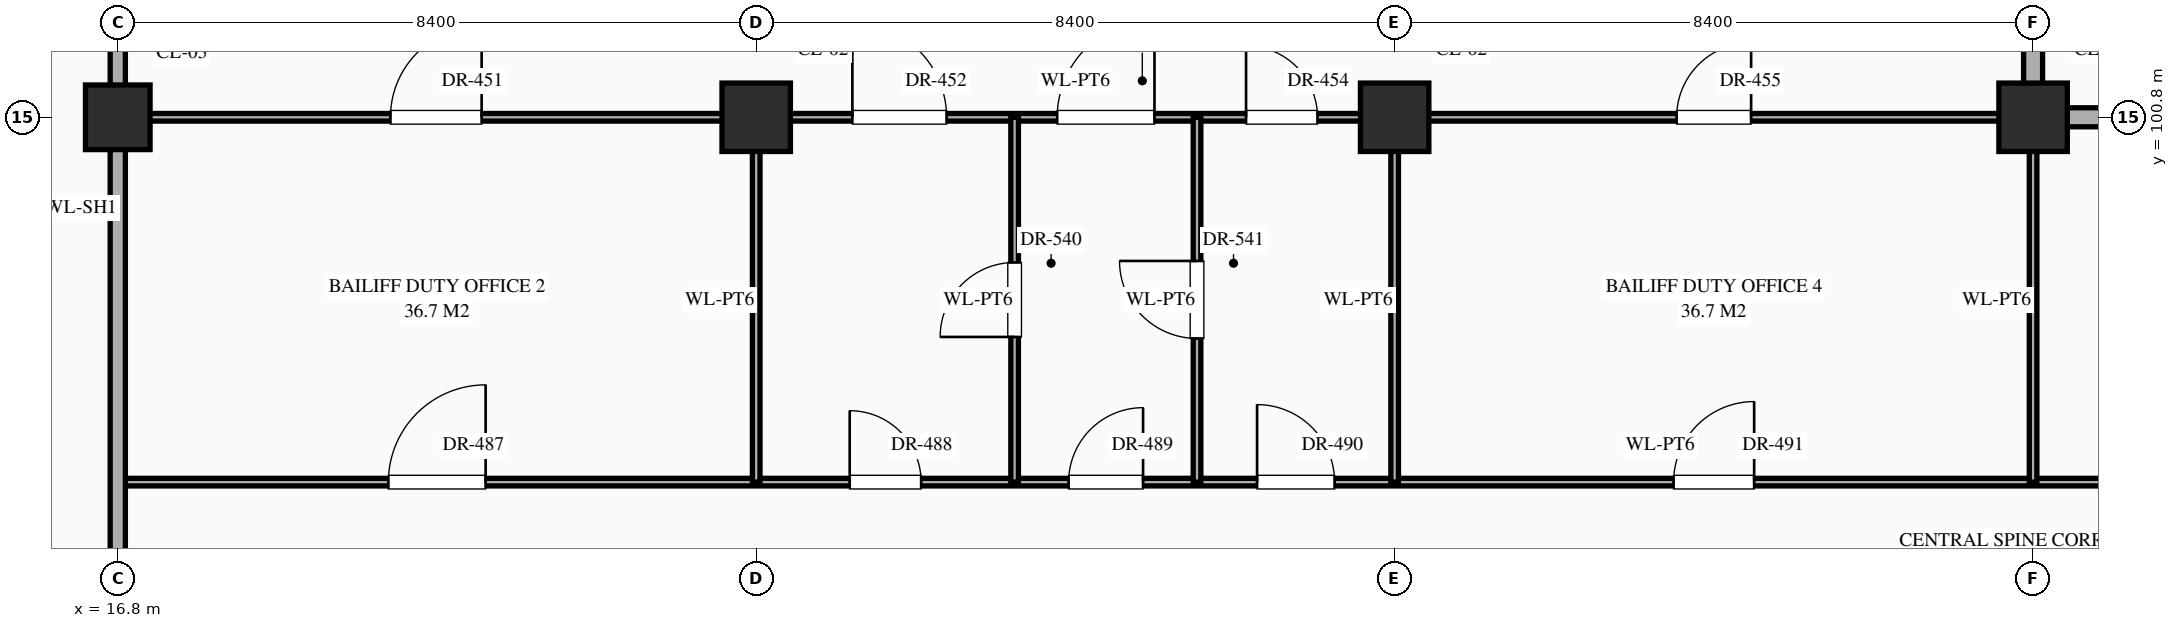
"""IFC4 building model, lengths in metres.
Left out: names, types, materials, properties, quantities, classifications, styles, units other than length and angle.
Written with IfcOpenShell. Run it as: python <this file> out.ifc"""

import sys

from ifc_helpers import new_model, si_unit, direction, frame, frame_2d, origin, origin_2d, place, context, subcontext, project, spatial, rectangle, extrude, element, fill, save


model = new_model("IFC4")
c1 = context("Model", 3, precision=1e-05, world=origin(), true_north=direction((0.0, 1.0)))
c2 = subcontext(c1, "Body", "Model", "MODEL_VIEW")
j1 = project(units=[si_unit("LENGTHUNIT", "METRE"), si_unit("PLANEANGLEUNIT", "RADIAN")], contexts=[c1])
p1 = place(None, origin())
s1 = spatial("IfcSite", under=j1, at=p1, CompositionType="ELEMENT")
p2 = place(p1, origin())
s2 = spatial("IfcBuilding", under=s1, at=p2, CompositionType="ELEMENT")
p3 = place(p2, frame((0.0, 0.0, -5.4)))
s3 = spatial("IfcBuildingStorey", under=s2, at=p3, CompositionType="ELEMENT", Elevation=-5.4)
p4 = place(p3, frame((16.8, 100.8, 0.0), z_axis=(0.0, 0.0, 1.0), x_axis=(1.0, 0.0, 0.0)))
e1 = element("IfcColumn", 1, at=p4, inside=s3, PredefinedType="COLUMN", context=c2, shape_type="SweptSolid", body=[
    extrude(rectangle(XDim=0.85, YDim=0.85, at=origin_2d()), origin(), (0.0, 0.0, 1.0), 5.4),
])
for number, where, z_axis, x_axis in (
    (2, (25.2, 100.8, 0.0), (0.0, 0.0, 1.0), (1.0, 0.0, 0.0)),
    (3, (33.6, 100.8, 0.0), (0.0, 0.0, 1.0), (1.0, 0.0, 0.0)),
    (4, (42.0, 100.8, 0.0), (0.0, 0.0, 1.0), (1.0, 0.0, 0.0)),
):
    element("IfcColumn", number, at=place(p3, frame(where, z_axis=z_axis, x_axis=x_axis)), inside=s3, PredefinedType="COLUMN", context=c2, shape_type="SweptSolid", body=[
        extrude(rectangle(XDim=0.9, YDim=0.9, at=origin_2d()), origin(), (0.0, 0.0, 1.0), 5.4),
    ])
p5 = place(p3, frame((16.8, 96.0, 0.0), z_axis=(0.0, 0.0, 1.0), x_axis=(1.0, 0.0, 0.0)))
e5 = element("IfcWall", 5, at=p5, inside=s3, PredefinedType="STANDARD", context=c2, shape_type="SweptSolid", body=[
    extrude(rectangle(XDim=134.4, YDim=0.1, at=frame_2d((67.2, 0.0))), origin(), (0.0, 0.0, 1.0), 5.1),
])
p6 = place(p5, frame((3.56, 0.0, 0.0)))
e6 = element("IfcOpeningElement", 6, at=p6, cuts=e5, PredefinedType="OPENING", context=c2, shape_type="SweptSolid", body=[
    extrude(rectangle(XDim=1.28, YDim=2.35, at=frame_2d((0.64, 1.175))), frame((0.0, 0.062, 0.0), z_axis=(0.0, -1.0, 0.0), x_axis=(1.0, 0.0, 0.0)), (0.0, 0.0, 1.0), 0.124),
])
p7 = place(p5, frame((9.63, 0.0, 0.0)))
e7 = element("IfcOpeningElement", 7, at=p7, cuts=e5, PredefinedType="OPENING", context=c2, shape_type="SweptSolid", body=[
    extrude(rectangle(XDim=0.94, YDim=2.3, at=frame_2d((0.47, 1.15))), frame((0.0, 0.062, 0.0), z_axis=(0.0, -1.0, 0.0), x_axis=(1.0, 0.0, 0.0)), (0.0, 0.0, 1.0), 0.124),
])
p8 = place(p5, frame((12.51, 0.0, 0.0)))
e8 = element("IfcOpeningElement", 8, at=p8, cuts=e5, PredefinedType="OPENING", context=c2, shape_type="SweptSolid", body=[
    extrude(rectangle(XDim=0.98, YDim=2.35, at=frame_2d((0.49, 1.175))), frame((0.0, 0.062, 0.0), z_axis=(0.0, -1.0, 0.0), x_axis=(1.0, 0.0, 0.0)), (0.0, 0.0, 1.0), 0.124),
])
p9 = place(p5, frame((14.99, 0.0, 0.0)))
e9 = element("IfcOpeningElement", 9, at=p9, cuts=e5, PredefinedType="OPENING", context=c2, shape_type="SweptSolid", body=[
    extrude(rectangle(XDim=1.02, YDim=2.4, at=frame_2d((0.51, 1.2))), frame((0.0, 0.062, 0.0), z_axis=(0.0, -1.0, 0.0), x_axis=(1.0, 0.0, 0.0)), (0.0, 0.0, 1.0), 0.124),
])
p10 = place(p5, frame((20.47, 0.0, 0.0)))
e10 = element("IfcOpeningElement", 10, at=p10, cuts=e5, PredefinedType="OPENING", context=c2, shape_type="SweptSolid", body=[
    extrude(rectangle(XDim=1.06, YDim=2.4, at=frame_2d((0.53, 1.2))), frame((0.0, 0.062, 0.0), z_axis=(0.0, -1.0, 0.0), x_axis=(1.0, 0.0, 0.0)), (0.0, 0.0, 1.0), 0.124),
])
p11 = place(p5, frame((28.83, 0.0, 0.0)))
e11 = element("IfcOpeningElement", 11, at=p11, cuts=e5, PredefinedType="OPENING", context=c2, shape_type="SweptSolid", body=[
    extrude(rectangle(XDim=1.14, YDim=2.4, at=frame_2d((0.57, 1.2))), frame((0.0, 0.062, 0.0), z_axis=(0.0, -1.0, 0.0), x_axis=(1.0, 0.0, 0.0)), (0.0, 0.0, 1.0), 0.124),
])
p12 = place(p5, frame((34.78, 0.0, 0.0)))
e12 = element("IfcOpeningElement", 12, at=p12, cuts=e5, PredefinedType="OPENING", context=c2, shape_type="SweptSolid", body=[
    extrude(rectangle(XDim=1.04, YDim=2.2, at=frame_2d((0.52, 1.1))), frame((0.0, 0.062, 0.0), z_axis=(0.0, -1.0, 0.0), x_axis=(1.0, 0.0, 0.0)), (0.0, 0.0, 1.0), 0.124),
])
p13 = place(p5, frame((37.66, 0.0, 0.0)))
e13 = element("IfcOpeningElement", 13, at=p13, cuts=e5, PredefinedType="OPENING", context=c2, shape_type="SweptSolid", body=[
    extrude(rectangle(XDim=1.08, YDim=2.25, at=frame_2d((0.54, 1.125))), frame((0.0, 0.062, 0.0), z_axis=(0.0, -1.0, 0.0), x_axis=(1.0, 0.0, 0.0)), (0.0, 0.0, 1.0), 0.124),
])
p14 = place(p5, frame((40.14, 0.0, 0.0)))
e14 = element("IfcOpeningElement", 14, at=p14, cuts=e5, PredefinedType="OPENING", context=c2, shape_type="SweptSolid", body=[
    extrude(rectangle(XDim=1.12, YDim=2.25, at=frame_2d((0.56, 1.125))), frame((0.0, 0.062, 0.0), z_axis=(0.0, -1.0, 0.0), x_axis=(1.0, 0.0, 0.0)), (0.0, 0.0, 1.0), 0.124),
])
p15 = place(p5, frame((45.62, 0.0, 0.0)))
e15 = element("IfcOpeningElement", 15, at=p15, cuts=e5, PredefinedType="OPENING", context=c2, shape_type="SweptSolid", body=[
    extrude(rectangle(XDim=1.16, YDim=2.3, at=frame_2d((0.58, 1.15))), frame((0.0, 0.062, 0.0), z_axis=(0.0, -1.0, 0.0), x_axis=(1.0, 0.0, 0.0)), (0.0, 0.0, 1.0), 0.124),
])
p16 = place(p5, frame((54.0, 0.0, 0.0)))
e16 = element("IfcOpeningElement", 16, at=p16, cuts=e5, PredefinedType="OPENING", context=c2, shape_type="SweptSolid", body=[
    extrude(rectangle(XDim=1.2, YDim=2.35, at=frame_2d((0.6, 1.175))), frame((0.0, 0.062, 0.0), z_axis=(0.0, -1.0, 0.0), x_axis=(1.0, 0.0, 0.0)), (0.0, 0.0, 1.0), 0.124),
])
p17 = place(p5, frame((62.38, 0.0, 0.0)))
e17 = element("IfcOpeningElement", 17, at=p17, cuts=e5, PredefinedType="OPENING", context=c2, shape_type="SweptSolid", body=[
    extrude(rectangle(XDim=1.24, YDim=2.3, at=frame_2d((0.62, 1.15))), frame((0.0, 0.062, 0.0), z_axis=(0.0, -1.0, 0.0), x_axis=(1.0, 0.0, 0.0)), (0.0, 0.0, 1.0), 0.124),
])
p18 = place(p5, frame((68.37, 0.0, 0.0)))
e18 = element("IfcOpeningElement", 18, at=p18, cuts=e5, PredefinedType="OPENING", context=c2, shape_type="SweptSolid", body=[
    extrude(rectangle(XDim=1.06, YDim=2.4, at=frame_2d((0.53, 1.2))), frame((0.0, 0.062, 0.0), z_axis=(0.0, -1.0, 0.0), x_axis=(1.0, 0.0, 0.0)), (0.0, 0.0, 1.0), 0.124),
])
p19 = place(p5, frame((71.23, 0.0, 0.0)))
e19 = element("IfcOpeningElement", 19, at=p19, cuts=e5, PredefinedType="OPENING", context=c2, shape_type="SweptSolid", body=[
    extrude(rectangle(XDim=1.14, YDim=2.4, at=frame_2d((0.57, 1.2))), frame((0.0, 0.062, 0.0), z_axis=(0.0, -1.0, 0.0), x_axis=(1.0, 0.0, 0.0)), (0.0, 0.0, 1.0), 0.124),
])
p20 = place(p5, frame((73.85, 0.0, 0.0)))
e20 = element("IfcOpeningElement", 20, at=p20, cuts=e5, PredefinedType="OPENING", context=c2, shape_type="SweptSolid", body=[
    extrude(rectangle(XDim=0.9, YDim=2.15, at=frame_2d((0.45, 1.075))), frame((0.0, 0.062, 0.0), z_axis=(0.0, -1.0, 0.0), x_axis=(1.0, 0.0, 0.0)), (0.0, 0.0, 1.0), 0.124),
])
p21 = place(p5, frame((79.37, 0.0, 0.0)))
e21 = element("IfcOpeningElement", 21, at=p21, cuts=e5, PredefinedType="OPENING", context=c2, shape_type="SweptSolid", body=[
    extrude(rectangle(XDim=0.86, YDim=2.1, at=frame_2d((0.43, 1.05))), frame((0.0, 0.062, 0.0), z_axis=(0.0, -1.0, 0.0), x_axis=(1.0, 0.0, 0.0)), (0.0, 0.0, 1.0), 0.124),
])
p22 = place(p5, frame((87.74, 0.0, 0.0)))
e22 = element("IfcOpeningElement", 22, at=p22, cuts=e5, PredefinedType="OPENING", context=c2, shape_type="SweptSolid", body=[
    extrude(rectangle(XDim=0.92, YDim=2.15, at=frame_2d((0.46, 1.075))), frame((0.0, 0.062, 0.0), z_axis=(0.0, -1.0, 0.0), x_axis=(1.0, 0.0, 0.0)), (0.0, 0.0, 1.0), 0.124),
])
p23 = place(p5, frame((93.62, 0.0, 0.0)))
e23 = element("IfcOpeningElement", 23, at=p23, cuts=e5, PredefinedType="OPENING", context=c2, shape_type="SweptSolid", body=[
    extrude(rectangle(XDim=0.96, YDim=2.2, at=frame_2d((0.48, 1.1))), frame((0.0, 0.062, 0.0), z_axis=(0.0, -1.0, 0.0), x_axis=(1.0, 0.0, 0.0)), (0.0, 0.0, 1.0), 0.124),
])
p24 = place(p5, frame((96.5, 0.0, 0.0)))
e24 = element("IfcOpeningElement", 24, at=p24, cuts=e5, PredefinedType="OPENING", context=c2, shape_type="SweptSolid", body=[
    extrude(rectangle(XDim=1.0, YDim=2.25, at=frame_2d((0.5, 1.125))), frame((0.0, 0.062, 0.0), z_axis=(0.0, -1.0, 0.0), x_axis=(1.0, 0.0, 0.0)), (0.0, 0.0, 1.0), 0.124),
])
p25 = place(p5, frame((98.98, 0.0, 0.0)))
e25 = element("IfcOpeningElement", 25, at=p25, cuts=e5, PredefinedType="OPENING", context=c2, shape_type="SweptSolid", body=[
    extrude(rectangle(XDim=1.04, YDim=2.2, at=frame_2d((0.52, 1.1))), frame((0.0, 0.062, 0.0), z_axis=(0.0, -1.0, 0.0), x_axis=(1.0, 0.0, 0.0)), (0.0, 0.0, 1.0), 0.124),
])
p26 = place(p5, frame((104.53, 0.0, 0.0)))
e26 = element("IfcOpeningElement", 26, at=p26, cuts=e5, PredefinedType="OPENING", context=c2, shape_type="SweptSolid", body=[
    extrude(rectangle(XDim=0.94, YDim=2.3, at=frame_2d((0.47, 1.15))), frame((0.0, 0.062, 0.0), z_axis=(0.0, -1.0, 0.0), x_axis=(1.0, 0.0, 0.0)), (0.0, 0.0, 1.0), 0.124),
])
p27 = place(p5, frame((112.91, 0.0, 0.0)))
e27 = element("IfcOpeningElement", 27, at=p27, cuts=e5, PredefinedType="OPENING", context=c2, shape_type="SweptSolid", body=[
    extrude(rectangle(XDim=0.98, YDim=2.35, at=frame_2d((0.49, 1.175))), frame((0.0, 0.062, 0.0), z_axis=(0.0, -1.0, 0.0), x_axis=(1.0, 0.0, 0.0)), (0.0, 0.0, 1.0), 0.124),
])
p28 = place(p5, frame((118.79, 0.0, 0.0)))
e28 = element("IfcOpeningElement", 28, at=p28, cuts=e5, PredefinedType="OPENING", context=c2, shape_type="SweptSolid", body=[
    extrude(rectangle(XDim=1.02, YDim=2.4, at=frame_2d((0.51, 1.2))), frame((0.0, 0.062, 0.0), z_axis=(0.0, -1.0, 0.0), x_axis=(1.0, 0.0, 0.0)), (0.0, 0.0, 1.0), 0.124),
])
p29 = place(p5, frame((121.67, 0.0, 0.0)))
e29 = element("IfcOpeningElement", 29, at=p29, cuts=e5, PredefinedType="OPENING", context=c2, shape_type="SweptSolid", body=[
    extrude(rectangle(XDim=1.06, YDim=2.4, at=frame_2d((0.53, 1.2))), frame((0.0, 0.062, 0.0), z_axis=(0.0, -1.0, 0.0), x_axis=(1.0, 0.0, 0.0)), (0.0, 0.0, 1.0), 0.124),
])
p30 = place(p5, frame((124.13, 0.0, 0.0)))
e30 = element("IfcOpeningElement", 30, at=p30, cuts=e5, PredefinedType="OPENING", context=c2, shape_type="SweptSolid", body=[
    extrude(rectangle(XDim=1.14, YDim=2.4, at=frame_2d((0.57, 1.2))), frame((0.0, 0.062, 0.0), z_axis=(0.0, -1.0, 0.0), x_axis=(1.0, 0.0, 0.0)), (0.0, 0.0, 1.0), 0.124),
])
p31 = place(p5, frame((129.75, 0.0, 0.0)))
e31 = element("IfcOpeningElement", 31, at=p31, cuts=e5, PredefinedType="OPENING", context=c2, shape_type="SweptSolid", body=[
    extrude(rectangle(XDim=0.9, YDim=2.15, at=frame_2d((0.45, 1.075))), frame((0.0, 0.062, 0.0), z_axis=(0.0, -1.0, 0.0), x_axis=(1.0, 0.0, 0.0)), (0.0, 0.0, 1.0), 0.124),
])
p32 = place(p3, frame((16.8, 100.8, 0.0), z_axis=(0.0, 0.0, 1.0), x_axis=(1.0, 0.0, 0.0)))
e32 = element("IfcWall", 32, at=p32, inside=s3, PredefinedType="STANDARD", context=c2, shape_type="SweptSolid", body=[
    extrude(rectangle(XDim=25.2, YDim=0.1, at=frame_2d((12.6, 0.0))), origin(), (0.0, 0.0, 1.0), 4.25),
])
p33 = place(p32, frame((3.587, 0.0, 0.0)))
e33 = element("IfcOpeningElement", 33, at=p33, cuts=e32, PredefinedType="OPENING", context=c2, shape_type="SweptSolid", body=[
    extrude(rectangle(XDim=1.2, YDim=2.35, at=frame_2d((0.6, 1.175))), frame((0.0, 0.062, 0.0), z_axis=(0.0, -1.0, 0.0), x_axis=(1.0, 0.0, 0.0)), (0.0, 0.0, 1.0), 0.124),
])
p34 = place(p32, frame((9.665, 0.0, 0.0)))
e34 = element("IfcOpeningElement", 34, at=p34, cuts=e32, PredefinedType="OPENING", context=c2, shape_type="SweptSolid", body=[
    extrude(rectangle(XDim=1.24, YDim=2.3, at=frame_2d((0.62, 1.15))), frame((0.0, 0.062, 0.0), z_axis=(0.0, -1.0, 0.0), x_axis=(1.0, 0.0, 0.0)), (0.0, 0.0, 1.0), 0.124),
])
p35 = place(p32, frame((12.36, 0.0, 0.0)))
e35 = element("IfcOpeningElement", 35, at=p35, cuts=e32, PredefinedType="OPENING", context=c2, shape_type="SweptSolid", body=[
    extrude(rectangle(XDim=1.28, YDim=2.35, at=frame_2d((0.64, 1.175))), frame((0.0, 0.062, 0.0), z_axis=(0.0, -1.0, 0.0), x_axis=(1.0, 0.0, 0.0)), (0.0, 0.0, 1.0), 0.124),
])
p36 = place(p32, frame((14.845, 0.0, 0.0)))
e36 = element("IfcOpeningElement", 36, at=p36, cuts=e32, PredefinedType="OPENING", context=c2, shape_type="SweptSolid", body=[
    extrude(rectangle(XDim=0.94, YDim=2.3, at=frame_2d((0.47, 1.15))), frame((0.0, 0.062, 0.0), z_axis=(0.0, -1.0, 0.0), x_axis=(1.0, 0.0, 0.0)), (0.0, 0.0, 1.0), 0.124),
])
p37 = place(p32, frame((20.51, 0.0, 0.0)))
e37 = element("IfcOpeningElement", 37, at=p37, cuts=e32, PredefinedType="OPENING", context=c2, shape_type="SweptSolid", body=[
    extrude(rectangle(XDim=0.98, YDim=2.35, at=frame_2d((0.49, 1.175))), frame((0.0, 0.062, 0.0), z_axis=(0.0, -1.0, 0.0), x_axis=(1.0, 0.0, 0.0)), (0.0, 0.0, 1.0), 0.124),
])
p38 = place(p3, frame((42.0, 100.8, 0.0), z_axis=(0.0, 0.0, 1.0), x_axis=(1.0, 0.0, 0.0)))
e38 = element("IfcWall", 38, at=p38, inside=s3, PredefinedType="STANDARD", context=c2, shape_type="SweptSolid", body=[
    extrude(rectangle(XDim=4.2, YDim=0.25, at=frame_2d((2.1, 0.0))), origin(), (0.0, 0.0, 1.0), 4.25),
])
p39 = place(p3, frame((16.8, 91.2, 0.0), z_axis=(0.0, 0.0, 1.0), x_axis=(0.0, 1.0, 0.0)))
e39 = element("IfcWall", 39, at=p39, inside=s3, PredefinedType="STANDARD", context=c2, shape_type="SweptSolid", body=[
    extrude(rectangle(XDim=16.8, YDim=0.2, at=frame_2d((8.4, 0.0))), origin(), (0.0, 0.0, 1.0), 4.35),
])
p40 = place(p3, frame((25.2, 96.0, 0.0), z_axis=(0.0, 0.0, 1.0), x_axis=(0.0, 1.0, 0.0)))
e40 = element("IfcWall", 40, at=p40, inside=s3, PredefinedType="STANDARD", context=c2, shape_type="SweptSolid", body=[
    extrude(rectangle(XDim=4.8, YDim=0.1, at=frame_2d((2.4, 0.0))), origin(), (0.0, 0.0, 1.0), 4.35),
])
p41 = place(p3, frame((28.6, 96.0, 0.0), z_axis=(0.0, 0.0, 1.0), x_axis=(0.0, 1.0, 0.0)))
e41 = element("IfcWall", 41, at=p41, inside=s3, PredefinedType="STANDARD", context=c2, shape_type="SweptSolid", body=[
    extrude(rectangle(XDim=4.8, YDim=0.1, at=frame_2d((2.4, 0.0))), origin(), (0.0, 0.0, 1.0), 5.1),
])
p42 = place(p41, frame((1.91, 0.0, 0.0)))
e42 = element("IfcOpeningElement", 42, at=p42, cuts=e41, PredefinedType="OPENING", context=c2, shape_type="SweptSolid", body=[
    extrude(rectangle(XDim=0.98, YDim=2.35, at=frame_2d((0.49, 1.175))), frame((0.0, 0.062, 0.0), z_axis=(0.0, -1.0, 0.0), x_axis=(1.0, 0.0, 0.0)), (0.0, 0.0, 1.0), 0.124),
])
p43 = place(p3, frame((31.0, 96.0, 0.0), z_axis=(0.0, 0.0, 1.0), x_axis=(0.0, 1.0, 0.0)))
e43 = element("IfcWall", 43, at=p43, inside=s3, PredefinedType="STANDARD", context=c2, shape_type="SweptSolid", body=[
    extrude(rectangle(XDim=4.8, YDim=0.1, at=frame_2d((2.4, 0.0))), origin(), (0.0, 0.0, 1.0), 5.1),
])
p44 = place(p43, frame((1.89, 0.0, 0.0)))
e44 = element("IfcOpeningElement", 44, at=p44, cuts=e43, PredefinedType="OPENING", context=c2, shape_type="SweptSolid", body=[
    extrude(rectangle(XDim=1.02, YDim=2.4, at=frame_2d((0.51, 1.2))), frame((0.0, 0.062, 0.0), z_axis=(0.0, -1.0, 0.0), x_axis=(1.0, 0.0, 0.0)), (0.0, 0.0, 1.0), 0.124),
])
for number, where, z_axis, x_axis in (
    (45, (33.6, 96.0, 0.0), (0.0, 0.0, 1.0), (0.0, 1.0, 0.0)),
    (46, (42.0, 96.0, 0.0), (0.0, 0.0, 1.0), (0.0, 1.0, 0.0)),
):
    element("IfcWall", number, at=place(p3, frame(where, z_axis=z_axis, x_axis=x_axis)), inside=s3, PredefinedType="STANDARD", context=c2, shape_type="SweptSolid", body=[
        extrude(rectangle(XDim=4.8, YDim=0.1, at=frame_2d((2.4, 0.0))), origin(), (0.0, 0.0, 1.0), 4.35),
    ])
p45 = place(p3, frame((42.0, 100.8, 0.0), z_axis=(0.0, 0.0, 1.0), x_axis=(0.0, 1.0, 0.0)))
e47 = element("IfcWall", 47, at=p45, inside=s3, PredefinedType="STANDARD", context=c2, shape_type="SweptSolid", body=[
    extrude(rectangle(XDim=3.6, YDim=0.25, at=frame_2d((1.8, 0.0))), origin(), (0.0, 0.0, 1.0), 4.35),
])
p46 = place(p45, frame((0.885, 0.0, 0.0)))
e48 = element("IfcOpeningElement", 48, at=p46, cuts=e47, PredefinedType="OPENING", context=c2, shape_type="SweptSolid", body=[
    extrude(rectangle(XDim=1.0, YDim=2.2, at=frame_2d((0.5, 1.1))), frame((0.0, 0.137, 0.0), z_axis=(0.0, -1.0, 0.0), x_axis=(1.0, 0.0, 0.0)), (0.0, 0.0, 1.0), 0.274),
])
p47 = place(p33, origin())
e49 = element("IfcDoor", 49, at=p47, inside=s3, OperationType="SINGLE_SWING_RIGHT", PredefinedType="DOOR", context=c2, shape_type="SweptSolid", body=[
    extrude(rectangle(XDim=1.2, YDim=2.35, at=frame_2d((0.6, 1.175))), frame((0.0, 0.025, 0.0), z_axis=(0.0, -1.0, 0.0), x_axis=(1.0, 0.0, 0.0)), (0.0, 0.0, 1.0), 0.05),
])
fill(e33, e49)
p48 = place(p34, origin())
e50 = element("IfcDoor", 50, at=p48, inside=s3, OperationType="SINGLE_SWING_LEFT", PredefinedType="DOOR", context=c2, shape_type="SweptSolid", body=[
    extrude(rectangle(XDim=1.24, YDim=2.3, at=frame_2d((0.62, 1.15))), frame((0.0, 0.025, 0.0), z_axis=(0.0, -1.0, 0.0), x_axis=(1.0, 0.0, 0.0)), (0.0, 0.0, 1.0), 0.05),
])
fill(e34, e50)
p49 = place(p35, origin())
e51 = element("IfcDoor", 51, at=p49, inside=s3, OperationType="SINGLE_SWING_RIGHT", PredefinedType="DOOR", context=c2, shape_type="SweptSolid", body=[
    extrude(rectangle(XDim=1.28, YDim=2.35, at=frame_2d((0.64, 1.175))), frame((0.0, 0.025, 0.0), z_axis=(0.0, -1.0, 0.0), x_axis=(1.0, 0.0, 0.0)), (0.0, 0.0, 1.0), 0.05),
])
fill(e35, e51)
p50 = place(p36, origin())
e52 = element("IfcDoor", 52, at=p50, inside=s3, OperationType="SINGLE_SWING_LEFT", PredefinedType="DOOR", context=c2, shape_type="SweptSolid", body=[
    extrude(rectangle(XDim=0.94, YDim=2.3, at=frame_2d((0.47, 1.15))), frame((0.0, 0.025, 0.0), z_axis=(0.0, -1.0, 0.0), x_axis=(1.0, 0.0, 0.0)), (0.0, 0.0, 1.0), 0.05),
])
fill(e36, e52)
p51 = place(p37, origin())
e53 = element("IfcDoor", 53, at=p51, inside=s3, OperationType="SINGLE_SWING_RIGHT", PredefinedType="DOOR", context=c2, shape_type="SweptSolid", body=[
    extrude(rectangle(XDim=0.98, YDim=2.35, at=frame_2d((0.49, 1.175))), frame((0.0, 0.025, 0.0), z_axis=(0.0, -1.0, 0.0), x_axis=(1.0, 0.0, 0.0)), (0.0, 0.0, 1.0), 0.05),
])
fill(e37, e53)
p52 = place(p6, origin())
e54 = element("IfcDoor", 54, at=p52, inside=s3, OperationType="SINGLE_SWING_RIGHT", PredefinedType="DOOR", context=c2, shape_type="SweptSolid", body=[
    extrude(rectangle(XDim=1.28, YDim=2.35, at=frame_2d((0.64, 1.175))), frame((0.0, 0.025, 0.0), z_axis=(0.0, -1.0, 0.0), x_axis=(1.0, 0.0, 0.0)), (0.0, 0.0, 1.0), 0.05),
])
fill(e6, e54)
p53 = place(p7, origin())
e55 = element("IfcDoor", 55, at=p53, inside=s3, OperationType="SINGLE_SWING_LEFT", PredefinedType="DOOR", context=c2, shape_type="SweptSolid", body=[
    extrude(rectangle(XDim=0.94, YDim=2.3, at=frame_2d((0.47, 1.15))), frame((0.0, 0.025, 0.0), z_axis=(0.0, -1.0, 0.0), x_axis=(1.0, 0.0, 0.0)), (0.0, 0.0, 1.0), 0.05),
])
fill(e7, e55)
p54 = place(p8, origin())
e56 = element("IfcDoor", 56, at=p54, inside=s3, OperationType="SINGLE_SWING_RIGHT", PredefinedType="DOOR", context=c2, shape_type="SweptSolid", body=[
    extrude(rectangle(XDim=0.98, YDim=2.35, at=frame_2d((0.49, 1.175))), frame((0.0, 0.025, 0.0), z_axis=(0.0, -1.0, 0.0), x_axis=(1.0, 0.0, 0.0)), (0.0, 0.0, 1.0), 0.05),
])
fill(e8, e56)
p55 = place(p9, origin())
e57 = element("IfcDoor", 57, at=p55, inside=s3, OperationType="SINGLE_SWING_LEFT", PredefinedType="DOOR", context=c2, shape_type="SweptSolid", body=[
    extrude(rectangle(XDim=1.02, YDim=2.4, at=frame_2d((0.51, 1.2))), frame((0.0, 0.025, 0.0), z_axis=(0.0, -1.0, 0.0), x_axis=(1.0, 0.0, 0.0)), (0.0, 0.0, 1.0), 0.05),
])
fill(e9, e57)
p56 = place(p10, origin())
e58 = element("IfcDoor", 58, at=p56, inside=s3, OperationType="SINGLE_SWING_RIGHT", PredefinedType="DOOR", context=c2, shape_type="SweptSolid", body=[
    extrude(rectangle(XDim=1.06, YDim=2.4, at=frame_2d((0.53, 1.2))), frame((0.0, 0.025, 0.0), z_axis=(0.0, -1.0, 0.0), x_axis=(1.0, 0.0, 0.0)), (0.0, 0.0, 1.0), 0.05),
])
fill(e10, e58)
p57 = place(p42, origin())
e59 = element("IfcDoor", 59, at=p57, inside=s3, OperationType="SINGLE_SWING_LEFT", PredefinedType="DOOR", context=c2, shape_type="SweptSolid", body=[
    extrude(rectangle(XDim=0.98, YDim=2.35, at=frame_2d((0.49, 1.175))), frame((0.0, 0.025, 0.0), z_axis=(0.0, -1.0, 0.0), x_axis=(1.0, 0.0, 0.0)), (0.0, 0.0, 1.0), 0.05),
])
fill(e42, e59)
p58 = place(p44, origin())
e60 = element("IfcDoor", 60, at=p58, inside=s3, OperationType="SINGLE_SWING_RIGHT", PredefinedType="DOOR", context=c2, shape_type="SweptSolid", body=[
    extrude(rectangle(XDim=1.02, YDim=2.4, at=frame_2d((0.51, 1.2))), frame((0.0, 0.025, 0.0), z_axis=(0.0, -1.0, 0.0), x_axis=(1.0, 0.0, 0.0)), (0.0, 0.0, 1.0), 0.05),
])
fill(e44, e60)
save(model, sys.argv[1])
